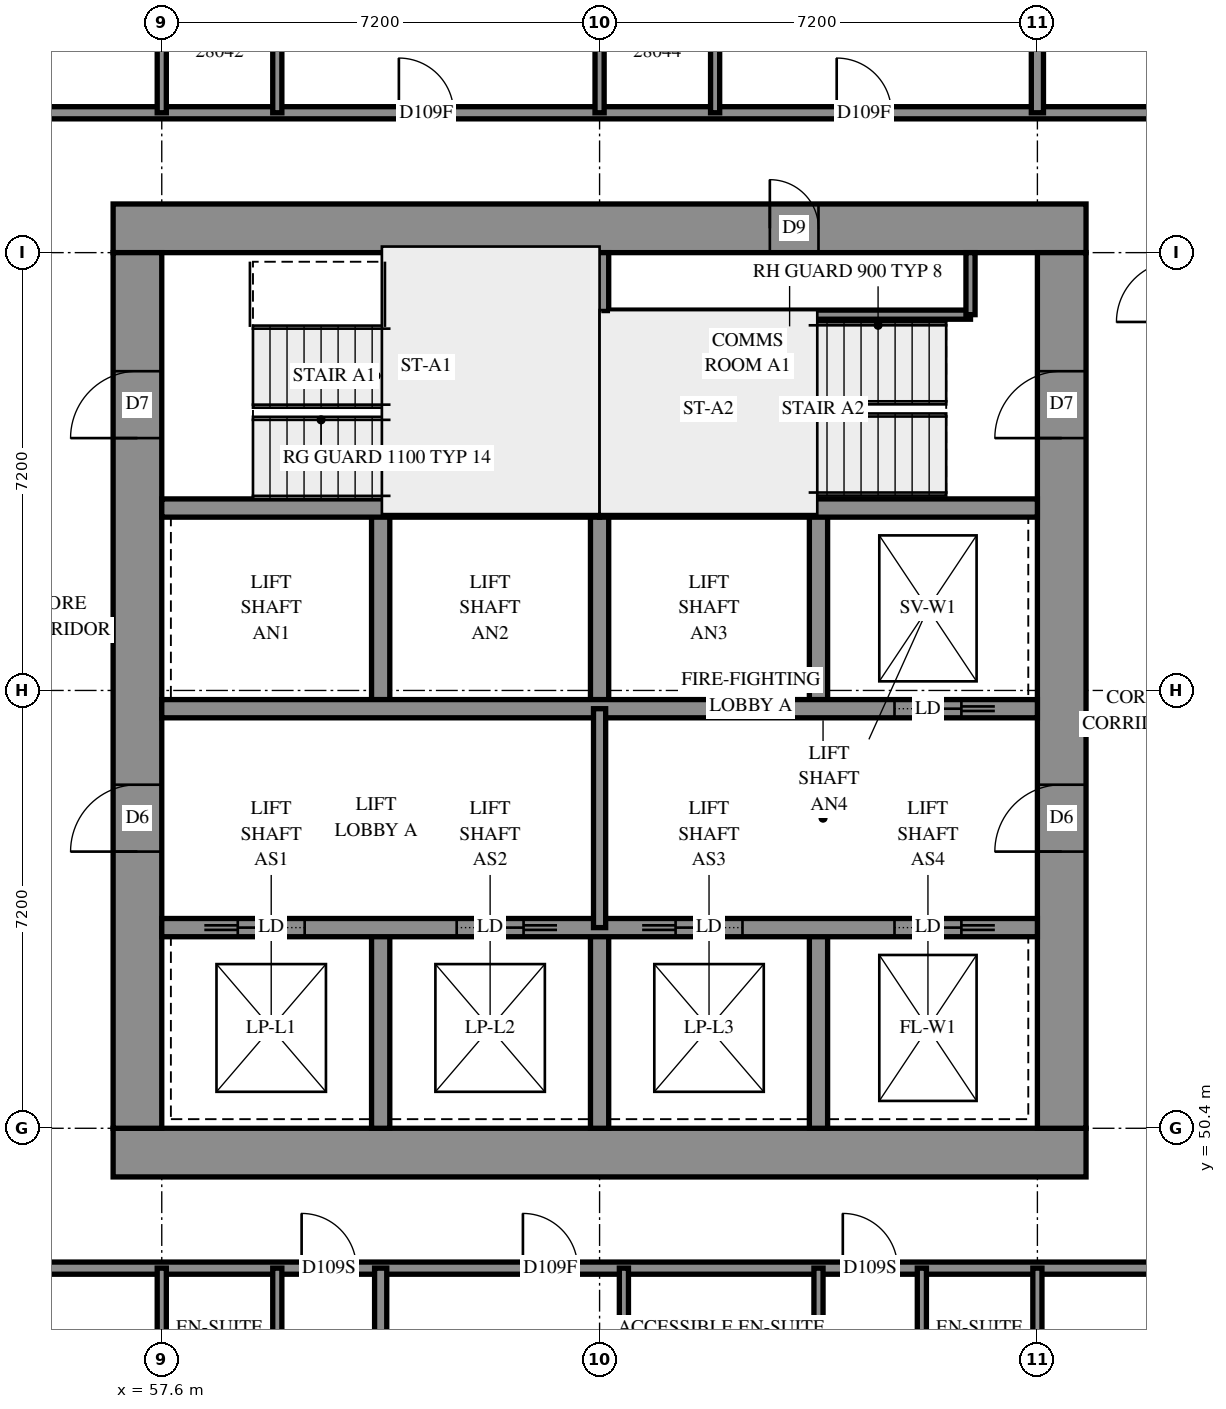
"""IFC4 building model, lengths in metres.
Left out: names, types, materials, properties, quantities, classifications, styles, units other than length and angle.
Written with IfcOpenShell. Run it as: python <this file> out.ifc"""

import sys

from ifc_helpers import new_model, si_unit, direction, frame, frame_2d, origin, place, context, subcontext, project, spatial, rectangle, extrude, element, fill, save


model = new_model("IFC4")
c1 = context("Model", 3, precision=1e-05, world=origin(), true_north=direction((0.0, 1.0)))
c2 = subcontext(c1, "Body", "Model", "MODEL_VIEW")
j1 = project(units=[si_unit("LENGTHUNIT", "METRE"), si_unit("PLANEANGLEUNIT", "RADIAN")], contexts=[c1])
p1 = place(None, origin())
s1 = spatial("IfcSite", under=j1, at=p1, CompositionType="ELEMENT")
p2 = place(p1, origin())
s2 = spatial("IfcBuilding", under=s1, at=p2, CompositionType="ELEMENT")
p3 = place(p2, frame((0.0, 0.0, 105.0)))
s3 = spatial("IfcBuildingStorey", under=s2, at=p3, CompositionType="ELEMENT", Elevation=105.0)
p4 = place(p3, frame((56.8, 50.0, -0.3), z_axis=(0.0, 0.0, 1.0), x_axis=(1.0, 0.0, 0.0)))
e1 = element("IfcWall", 1, at=p4, inside=s3, PredefinedType="SHEAR", context=c2, shape_type="SweptSolid", body=[
    extrude(rectangle(XDim=16.0, YDim=0.8, at=frame_2d((8.0, 0.0))), origin(), (0.0, 0.0, 1.0), 2.7),
])
p5 = place(p3, frame((56.8, 65.2, -0.3), z_axis=(0.0, 0.0, 1.0), x_axis=(1.0, 0.0, 0.0)))
e2 = element("IfcWall", 2, at=p5, inside=s3, PredefinedType="SHEAR", context=c2, shape_type="SweptSolid", body=[
    extrude(rectangle(XDim=16.0, YDim=0.8, at=frame_2d((8.0, 0.0))), origin(), (0.0, 0.0, 1.0), 2.7),
])
p6 = place(p5, frame((10.8, 0.0, 0.3)))
e3 = element("IfcOpeningElement", 3, at=p6, cuts=e2, PredefinedType="OPENING", context=c2, shape_type="SweptSolid", body=[
    extrude(rectangle(XDim=0.8, YDim=2.1, at=frame_2d((0.4, 1.05))), frame((0.0, 0.41, 0.0), z_axis=(0.0, -1.0, 0.0), x_axis=(1.0, 0.0, 0.0)), (0.0, 0.0, 1.0), 0.82),
])
p7 = place(p3, frame((57.2, 50.4, -0.3), z_axis=(0.0, 0.0, 1.0), x_axis=(0.0, 1.0, 0.0)))
e4 = element("IfcWall", 4, at=p7, inside=s3, PredefinedType="SHEAR", context=c2, shape_type="SweptSolid", body=[
    extrude(rectangle(XDim=14.4, YDim=0.8, at=frame_2d((7.2, 0.0))), origin(), (0.0, 0.0, 1.0), 2.7),
])
p8 = place(p7, frame((4.55, 0.0, 0.3)))
e5 = element("IfcOpeningElement", 5, at=p8, cuts=e4, PredefinedType="OPENING", context=c2, shape_type="SweptSolid", body=[
    extrude(rectangle(XDim=1.1, YDim=2.1, at=frame_2d((0.55, 1.05))), frame((0.0, 0.41, 0.0), z_axis=(0.0, -1.0, 0.0), x_axis=(1.0, 0.0, 0.0)), (0.0, 0.0, 1.0), 0.82),
])
p9 = place(p7, frame((11.35, 0.0, 0.3)))
e6 = element("IfcOpeningElement", 6, at=p9, cuts=e4, PredefinedType="OPENING", context=c2, shape_type="SweptSolid", body=[
    extrude(rectangle(XDim=1.1, YDim=2.1, at=frame_2d((0.55, 1.05))), frame((0.0, 0.41, 0.0), z_axis=(0.0, -1.0, 0.0), x_axis=(1.0, 0.0, 0.0)), (0.0, 0.0, 1.0), 0.82),
])
p10 = place(p3, frame((72.4, 50.4, -0.3), z_axis=(0.0, 0.0, 1.0), x_axis=(0.0, 1.0, 0.0)))
e7 = element("IfcWall", 7, at=p10, inside=s3, PredefinedType="SHEAR", context=c2, shape_type="SweptSolid", body=[
    extrude(rectangle(XDim=14.4, YDim=0.8, at=frame_2d((7.2, 0.0))), origin(), (0.0, 0.0, 1.0), 2.7),
])
p11 = place(p10, frame((4.55, 0.0, 0.3)))
e8 = element("IfcOpeningElement", 8, at=p11, cuts=e7, PredefinedType="OPENING", context=c2, shape_type="SweptSolid", body=[
    extrude(rectangle(XDim=1.1, YDim=2.1, at=frame_2d((0.55, 1.05))), frame((0.0, 0.41, 0.0), z_axis=(0.0, -1.0, 0.0), x_axis=(1.0, 0.0, 0.0)), (0.0, 0.0, 1.0), 0.82),
])
p12 = place(p10, frame((11.35, 0.0, 0.3)))
e9 = element("IfcOpeningElement", 9, at=p12, cuts=e7, PredefinedType="OPENING", context=c2, shape_type="SweptSolid", body=[
    extrude(rectangle(XDim=1.1, YDim=2.1, at=frame_2d((0.55, 1.05))), frame((0.0, 0.41, 0.0), z_axis=(0.0, -1.0, 0.0), x_axis=(1.0, 0.0, 0.0)), (0.0, 0.0, 1.0), 0.82),
])
for number, where, z_axis, x_axis in (
    (10, (61.2, 50.4, 0.0), (0.0, 0.0, 1.0), (0.0, 1.0, 0.0)),
    (11, (61.2, 57.3, 0.0), (0.0, 0.0, 1.0), (0.0, 1.0, 0.0)),
    (12, (64.8, 50.4, 0.0), (0.0, 0.0, 1.0), (0.0, 1.0, 0.0)),
    (13, (64.8, 57.3, 0.0), (0.0, 0.0, 1.0), (0.0, 1.0, 0.0)),
    (14, (68.4, 50.4, 0.0), (0.0, 0.0, 1.0), (0.0, 1.0, 0.0)),
    (15, (68.4, 57.3, 0.0), (0.0, 0.0, 1.0), (0.0, 1.0, 0.0)),
):
    element("IfcWall", number, at=place(p3, frame(where, z_axis=z_axis, x_axis=x_axis)), inside=s3, PredefinedType="SOLIDWALL", context=c2, shape_type="SweptSolid", body=[
        extrude(rectangle(XDim=3.3, YDim=0.3, at=frame_2d((1.65, 0.0))), origin(), (0.0, 0.0, 1.0), 3.1),
    ])
p13 = place(p3, frame((57.6, 53.7, 0.0), z_axis=(0.0, 0.0, 1.0), x_axis=(1.0, 0.0, 0.0)))
e16 = element("IfcWall", 16, at=p13, inside=s3, PredefinedType="SOLIDWALL", context=c2, shape_type="SweptSolid", body=[
    extrude(rectangle(XDim=14.4, YDim=0.3, at=frame_2d((7.2, 0.0))), origin(), (0.0, 0.0, 1.0), 3.1),
])
p14 = place(p13, frame((1.25, 0.0, 0.0)))
e17 = element("IfcOpeningElement", 17, at=p14, cuts=e16, PredefinedType="OPENING", context=c2, shape_type="SweptSolid", body=[
    extrude(rectangle(XDim=1.1, YDim=2.1, at=frame_2d((0.55, 1.05))), frame((0.0, 0.16, 0.0), z_axis=(0.0, -1.0, 0.0), x_axis=(1.0, 0.0, 0.0)), (0.0, 0.0, 1.0), 0.32),
])
p15 = place(p13, frame((4.85, 0.0, 0.0)))
e18 = element("IfcOpeningElement", 18, at=p15, cuts=e16, PredefinedType="OPENING", context=c2, shape_type="SweptSolid", body=[
    extrude(rectangle(XDim=1.1, YDim=2.1, at=frame_2d((0.55, 1.05))), frame((0.0, 0.16, 0.0), z_axis=(0.0, -1.0, 0.0), x_axis=(1.0, 0.0, 0.0)), (0.0, 0.0, 1.0), 0.32),
])
p16 = place(p13, frame((8.45, 0.0, 0.0)))
e19 = element("IfcOpeningElement", 19, at=p16, cuts=e16, PredefinedType="OPENING", context=c2, shape_type="SweptSolid", body=[
    extrude(rectangle(XDim=1.1, YDim=2.1, at=frame_2d((0.55, 1.05))), frame((0.0, 0.16, 0.0), z_axis=(0.0, -1.0, 0.0), x_axis=(1.0, 0.0, 0.0)), (0.0, 0.0, 1.0), 0.32),
])
p17 = place(p13, frame((12.05, 0.0, 0.0)))
e20 = element("IfcOpeningElement", 20, at=p17, cuts=e16, PredefinedType="OPENING", context=c2, shape_type="SweptSolid", body=[
    extrude(rectangle(XDim=1.1, YDim=2.1, at=frame_2d((0.55, 1.05))), frame((0.0, 0.16, 0.0), z_axis=(0.0, -1.0, 0.0), x_axis=(1.0, 0.0, 0.0)), (0.0, 0.0, 1.0), 0.32),
])
p18 = place(p3, frame((57.6, 57.3, 0.0), z_axis=(0.0, 0.0, 1.0), x_axis=(1.0, 0.0, 0.0)))
e21 = element("IfcWall", 21, at=p18, inside=s3, PredefinedType="SOLIDWALL", context=c2, shape_type="SweptSolid", body=[
    extrude(rectangle(XDim=14.4, YDim=0.3, at=frame_2d((7.2, 0.0))), origin(), (0.0, 0.0, 1.0), 3.1),
])
p19 = place(p18, frame((12.05, 0.0, 0.0)))
e22 = element("IfcOpeningElement", 22, at=p19, cuts=e21, PredefinedType="OPENING", context=c2, shape_type="SweptSolid", body=[
    extrude(rectangle(XDim=1.1, YDim=2.1, at=frame_2d((0.55, 1.05))), frame((0.0, 0.16, 0.0), z_axis=(0.0, -1.0, 0.0), x_axis=(1.0, 0.0, 0.0)), (0.0, 0.0, 1.0), 0.32),
])
for number, where, z_axis, x_axis in (
    (23, (57.6, 60.6, 0.0), (0.0, 0.0, 1.0), (1.0, 0.0, 0.0)),
    (24, (64.8, 60.6, 0.0), (0.0, 0.0, 1.0), (1.0, 0.0, 0.0)),
):
    element("IfcWall", number, at=place(p3, frame(where, z_axis=z_axis, x_axis=x_axis)), inside=s3, PredefinedType="SOLIDWALL", context=c2, shape_type="SweptSolid", body=[
        extrude(rectangle(XDim=7.2, YDim=0.3, at=frame_2d((3.6, 0.0))), origin(), (0.0, 0.0, 1.0), 3.1),
    ])
p20 = place(p3, frame((64.8, 60.6, 0.0), z_axis=(0.0, 0.0, 1.0), x_axis=(0.0, 1.0, 0.0)))
e25 = element("IfcWall", 25, at=p20, inside=s3, PredefinedType="SOLIDWALL", context=c2, shape_type="SweptSolid", body=[
    extrude(rectangle(XDim=4.2, YDim=0.3, at=frame_2d((2.1, 0.0))), origin(), (0.0, 0.0, 1.0), 3.1),
])
p21 = place(p3, frame((64.95, 63.78, 0.0), z_axis=(0.0, 0.0, 1.0), x_axis=(1.0, 0.0, 0.0)))
e26 = element("IfcWall", 26, at=p21, inside=s3, PredefinedType="PARTITIONING", context=c2, shape_type="SweptSolid", body=[
    extrude(rectangle(XDim=5.95, YDim=0.15, at=frame_2d((2.975, 0.0))), origin(), (0.0, 0.0, 1.0), 3.1),
])
p22 = place(p3, frame((70.9, 63.78, 0.0), z_axis=(0.0, 0.0, 1.0), x_axis=(0.0, 1.0, 0.0)))
e27 = element("IfcWall", 27, at=p22, inside=s3, PredefinedType="PARTITIONING", context=c2, shape_type="SweptSolid", body=[
    extrude(rectangle(XDim=1.02, YDim=0.15, at=frame_2d((0.51, 0.0))), origin(), (0.0, 0.0, 1.0), 3.1),
])
p23 = place(p3, frame((64.8, 53.7, 0.0), z_axis=(0.0, 0.0, 1.0), x_axis=(0.0, 1.0, 0.0)))
e28 = element("IfcWall", 28, at=p23, inside=s3, PredefinedType="PARTITIONING", context=c2, shape_type="SweptSolid", body=[
    extrude(rectangle(XDim=3.6, YDim=0.2, at=frame_2d((1.8, 0.0))), origin(), (0.0, 0.0, 1.0), 3.1),
])
p24 = place(p3, frame((55.3, 48.1, 0.0), z_axis=(0.0, 0.0, 1.0), x_axis=(1.0, 0.0, 0.0)))
e29 = element("IfcWall", 29, at=p24, inside=s3, PredefinedType="PARTITIONING", context=c2, shape_type="SweptSolid", body=[
    extrude(rectangle(XDim=19.092, YDim=0.2, at=frame_2d((9.546, 0.0))), origin(), (0.0, 0.0, 1.0), 3.1),
])
p25 = place(p24, frame((4.6, 0.0, 0.0)))
e30 = element("IfcOpeningElement", 30, at=p25, cuts=e29, PredefinedType="OPENING", context=c2, shape_type="SweptSolid", body=[
    extrude(rectangle(XDim=0.9, YDim=2.1, at=frame_2d((0.45, 1.05))), frame((0.0, 0.11, 0.0), z_axis=(0.0, -1.0, 0.0), x_axis=(1.0, 0.0, 0.0)), (0.0, 0.0, 1.0), 0.22),
])
p26 = place(p24, frame((8.239, 0.0, 0.0)))
e31 = element("IfcOpeningElement", 31, at=p26, cuts=e29, PredefinedType="OPENING", context=c2, shape_type="SweptSolid", body=[
    extrude(rectangle(XDim=0.9, YDim=2.1, at=frame_2d((0.45, 1.05))), frame((0.0, 0.11, 0.0), z_axis=(0.0, -1.0, 0.0), x_axis=(1.0, 0.0, 0.0)), (0.0, 0.0, 1.0), 0.22),
])
p27 = place(p24, frame((13.5, 0.0, 0.0)))
e32 = element("IfcOpeningElement", 32, at=p27, cuts=e29, PredefinedType="OPENING", context=c2, shape_type="SweptSolid", body=[
    extrude(rectangle(XDim=0.9, YDim=2.1, at=frame_2d((0.45, 1.05))), frame((0.0, 0.11, 0.0), z_axis=(0.0, -1.0, 0.0), x_axis=(1.0, 0.0, 0.0)), (0.0, 0.0, 1.0), 0.22),
])
p28 = place(p3, frame((55.3, 67.1, 0.0), z_axis=(0.0, 0.0, 1.0), x_axis=(1.0, 0.0, 0.0)))
e33 = element("IfcWall", 33, at=p28, inside=s3, PredefinedType="PARTITIONING", context=c2, shape_type="SweptSolid", body=[
    extrude(rectangle(XDim=19.0, YDim=0.2, at=frame_2d((9.5, 0.0))), origin(), (0.0, 0.0, 1.0), 3.1),
])
p29 = place(p28, frame((6.199, 0.0, 0.0)))
e34 = element("IfcOpeningElement", 34, at=p29, cuts=e33, PredefinedType="OPENING", context=c2, shape_type="SweptSolid", body=[
    extrude(rectangle(XDim=0.9, YDim=2.1, at=frame_2d((0.45, 1.05))), frame((0.0, 0.11, 0.0), z_axis=(0.0, -1.0, 0.0), x_axis=(1.0, 0.0, 0.0)), (0.0, 0.0, 1.0), 0.22),
])
p30 = place(p28, frame((13.399, 0.0, 0.0)))
e35 = element("IfcOpeningElement", 35, at=p30, cuts=e33, PredefinedType="OPENING", context=c2, shape_type="SweptSolid", body=[
    extrude(rectangle(XDim=0.9, YDim=2.1, at=frame_2d((0.45, 1.05))), frame((0.0, 0.11, 0.0), z_axis=(0.0, -1.0, 0.0), x_axis=(1.0, 0.0, 0.0)), (0.0, 0.0, 1.0), 0.22),
])
p31 = place(p3, frame((61.2, 42.291, 0.0), z_axis=(0.0, 0.0, 1.0), x_axis=(0.0, 1.0, 0.0)))
e36 = element("IfcWall", 36, at=p31, inside=s3, PredefinedType="PARTITIONING", context=c2, shape_type="SweptSolid", body=[
    extrude(rectangle(XDim=5.809, YDim=0.2, at=frame_2d((2.904, 0.0))), origin(), (0.0, 0.0, 1.0), 3.1),
])
p32 = place(p3, frame((72.0, 67.1, 0.0), z_axis=(0.0, 0.0, 1.0), x_axis=(0.0, 1.0, 0.0)))
e37 = element("IfcWall", 37, at=p32, inside=s3, PredefinedType="PARTITIONING", context=c2, shape_type="SweptSolid", body=[
    extrude(rectangle(XDim=4.4, YDim=0.2, at=frame_2d((2.2, 0.0))), origin(), (0.0, 0.0, 1.0), 3.1),
])
for number, where, z_axis, x_axis in (
    (38, (59.5, 67.1, 0.0), (0.0, 0.0, 1.0), (0.0, 1.0, 0.0)),
    (39, (57.6, 67.1, 0.0), (0.0, 0.0, 1.0), (0.0, 1.0, 0.0)),
    (40, (64.8, 67.1, 0.0), (0.0, 0.0, 1.0), (0.0, 1.0, 0.0)),
    (41, (66.7, 67.1, 0.0), (0.0, 0.0, 1.0), (0.0, 1.0, 0.0)),
    (42, (59.5, 45.7, 0.0), (0.0, 0.0, 1.0), (0.0, 1.0, 0.0)),
    (43, (57.6, 45.7, 0.0), (0.0, 0.0, 1.0), (0.0, 1.0, 0.0)),
    (44, (65.2, 45.7, 0.0), (0.0, 0.0, 1.0), (0.0, 1.0, 0.0)),
    (45, (68.4, 45.7, 0.0), (0.0, 0.0, 1.0), (0.0, 1.0, 0.0)),
    (46, (70.1, 45.7, 0.0), (0.0, 0.0, 1.0), (0.0, 1.0, 0.0)),
    (47, (72.0, 45.7, 0.0), (0.0, 0.0, 1.0), (0.0, 1.0, 0.0)),
):
    element("IfcWall", number, at=place(p3, frame(where, z_axis=z_axis, x_axis=x_axis)), inside=s3, PredefinedType="PARTITIONING", context=c2, shape_type="SweptSolid", body=[
        extrude(rectangle(XDim=2.4, YDim=0.15, at=frame_2d((1.2, 0.0))), origin(), (0.0, 0.0, 1.0), 3.1),
    ])
p33 = place(p6, origin())
e48 = element("IfcDoor", 48, at=p33, inside=s3, OperationType="SINGLE_SWING_RIGHT", PredefinedType="DOOR", context=c2, shape_type="SweptSolid", body=[
    extrude(rectangle(XDim=0.8, YDim=2.1, at=frame_2d((0.4, 1.05))), frame((0.0, -0.34, 0.0), z_axis=(0.0, -1.0, 0.0), x_axis=(1.0, 0.0, 0.0)), (0.0, 0.0, 1.0), 0.05),
])
fill(e3, e48)
p34 = place(p8, origin())
e49 = element("IfcDoor", 49, at=p34, inside=s3, OperationType="DOUBLE_DOOR_SINGLE_SWING", PredefinedType="DOOR", context=c2, shape_type="SweptSolid", body=[
    extrude(rectangle(XDim=1.1, YDim=2.1, at=frame_2d((0.55, 1.05))), frame((0.0, 0.025, 0.0), z_axis=(0.0, -1.0, 0.0), x_axis=(1.0, 0.0, 0.0)), (0.0, 0.0, 1.0), 0.05),
])
fill(e5, e49)
p35 = place(p11, origin())
e50 = element("IfcDoor", 50, at=p35, inside=s3, OperationType="DOUBLE_DOOR_SINGLE_SWING", PredefinedType="DOOR", context=c2, shape_type="SweptSolid", body=[
    extrude(rectangle(XDim=1.1, YDim=2.1, at=frame_2d((0.55, 1.05))), frame((0.0, 0.025, 0.0), z_axis=(0.0, -1.0, 0.0), x_axis=(1.0, 0.0, 0.0)), (0.0, 0.0, 1.0), 0.05),
])
fill(e8, e50)
p36 = place(p9, origin())
e51 = element("IfcDoor", 51, at=p36, inside=s3, OperationType="SINGLE_SWING_LEFT", PredefinedType="DOOR", context=c2, shape_type="SweptSolid", body=[
    extrude(rectangle(XDim=1.1, YDim=2.1, at=frame_2d((0.55, 1.05))), frame((0.0, 0.025, 0.0), z_axis=(0.0, -1.0, 0.0), x_axis=(1.0, 0.0, 0.0)), (0.0, 0.0, 1.0), 0.05),
])
fill(e6, e51)
p37 = place(p12, origin())
e52 = element("IfcDoor", 52, at=p37, inside=s3, OperationType="SINGLE_SWING_RIGHT", PredefinedType="DOOR", context=c2, shape_type="SweptSolid", body=[
    extrude(rectangle(XDim=1.1, YDim=2.1, at=frame_2d((0.55, 1.05))), frame((0.0, 0.025, 0.0), z_axis=(0.0, -1.0, 0.0), x_axis=(1.0, 0.0, 0.0)), (0.0, 0.0, 1.0), 0.05),
])
fill(e9, e52)
p38 = place(p14, origin())
e53 = element("IfcDoor", 53, at=p38, inside=s3, OperationType="SLIDING_TO_LEFT", PredefinedType="DOOR", context=c2, shape_type="SweptSolid", body=[
    extrude(rectangle(XDim=1.1, YDim=2.1, at=frame_2d((0.55, 1.05))), frame((0.0, 0.025, 0.0), z_axis=(0.0, -1.0, 0.0), x_axis=(1.0, 0.0, 0.0)), (0.0, 0.0, 1.0), 0.05),
])
fill(e17, e53)
p39 = place(p15, origin())
e54 = element("IfcDoor", 54, at=p39, inside=s3, OperationType="SLIDING_TO_RIGHT", PredefinedType="DOOR", context=c2, shape_type="SweptSolid", body=[
    extrude(rectangle(XDim=1.1, YDim=2.1, at=frame_2d((0.55, 1.05))), frame((0.0, 0.025, 0.0), z_axis=(0.0, -1.0, 0.0), x_axis=(1.0, 0.0, 0.0)), (0.0, 0.0, 1.0), 0.05),
])
fill(e18, e54)
p40 = place(p16, origin())
e55 = element("IfcDoor", 55, at=p40, inside=s3, OperationType="SLIDING_TO_LEFT", PredefinedType="DOOR", context=c2, shape_type="SweptSolid", body=[
    extrude(rectangle(XDim=1.1, YDim=2.1, at=frame_2d((0.55, 1.05))), frame((0.0, 0.025, 0.0), z_axis=(0.0, -1.0, 0.0), x_axis=(1.0, 0.0, 0.0)), (0.0, 0.0, 1.0), 0.05),
])
fill(e19, e55)
p41 = place(p17, origin())
e56 = element("IfcDoor", 56, at=p41, inside=s3, OperationType="SLIDING_TO_RIGHT", PredefinedType="DOOR", context=c2, shape_type="SweptSolid", body=[
    extrude(rectangle(XDim=1.1, YDim=2.1, at=frame_2d((0.55, 1.05))), frame((0.0, 0.025, 0.0), z_axis=(0.0, -1.0, 0.0), x_axis=(1.0, 0.0, 0.0)), (0.0, 0.0, 1.0), 0.05),
])
fill(e20, e56)
p42 = place(p19, origin())
e57 = element("IfcDoor", 57, at=p42, inside=s3, OperationType="SLIDING_TO_RIGHT", PredefinedType="DOOR", context=c2, shape_type="SweptSolid", body=[
    extrude(rectangle(XDim=1.1, YDim=2.1, at=frame_2d((0.55, 1.05))), frame((0.0, 0.025, 0.0), z_axis=(0.0, -1.0, 0.0), x_axis=(1.0, 0.0, 0.0)), (0.0, 0.0, 1.0), 0.05),
])
fill(e22, e57)
p43 = place(p29, origin())
e58 = element("IfcDoor", 58, at=p43, inside=s3, OperationType="SINGLE_SWING_RIGHT", PredefinedType="DOOR", context=c2, shape_type="SweptSolid", body=[
    extrude(rectangle(XDim=0.9, YDim=2.1, at=frame_2d((0.45, 1.05))), frame((0.0, 0.025, 0.0), z_axis=(0.0, -1.0, 0.0), x_axis=(1.0, 0.0, 0.0)), (0.0, 0.0, 1.0), 0.05),
])
fill(e34, e58)
p44 = place(p30, origin())
e59 = element("IfcDoor", 59, at=p44, inside=s3, OperationType="SINGLE_SWING_RIGHT", PredefinedType="DOOR", context=c2, shape_type="SweptSolid", body=[
    extrude(rectangle(XDim=0.9, YDim=2.1, at=frame_2d((0.45, 1.05))), frame((0.0, 0.025, 0.0), z_axis=(0.0, -1.0, 0.0), x_axis=(1.0, 0.0, 0.0)), (0.0, 0.0, 1.0), 0.05),
])
fill(e35, e59)
p45 = place(p25, origin())
e60 = element("IfcDoor", 60, at=p45, inside=s3, OperationType="SINGLE_SWING_LEFT", PredefinedType="DOOR", context=c2, shape_type="SweptSolid", body=[
    extrude(rectangle(XDim=0.9, YDim=2.1, at=frame_2d((0.45, 1.05))), frame((0.0, 0.025, 0.0), z_axis=(0.0, -1.0, 0.0), x_axis=(1.0, 0.0, 0.0)), (0.0, 0.0, 1.0), 0.05),
])
fill(e30, e60)
p46 = place(p26, origin())
e61 = element("IfcDoor", 61, at=p46, inside=s3, OperationType="SINGLE_SWING_RIGHT", PredefinedType="DOOR", context=c2, shape_type="SweptSolid", body=[
    extrude(rectangle(XDim=0.9, YDim=2.1, at=frame_2d((0.45, 1.05))), frame((0.0, 0.025, 0.0), z_axis=(0.0, -1.0, 0.0), x_axis=(1.0, 0.0, 0.0)), (0.0, 0.0, 1.0), 0.05),
])
fill(e31, e61)
p47 = place(p27, origin())
e62 = element("IfcDoor", 62, at=p47, inside=s3, OperationType="SINGLE_SWING_RIGHT", PredefinedType="DOOR", context=c2, shape_type="SweptSolid", body=[
    extrude(rectangle(XDim=0.9, YDim=2.1, at=frame_2d((0.45, 1.05))), frame((0.0, 0.025, 0.0), z_axis=(0.0, -1.0, 0.0), x_axis=(1.0, 0.0, 0.0)), (0.0, 0.0, 1.0), 0.05),
])
fill(e32, e62)
save(model, sys.argv[1])
